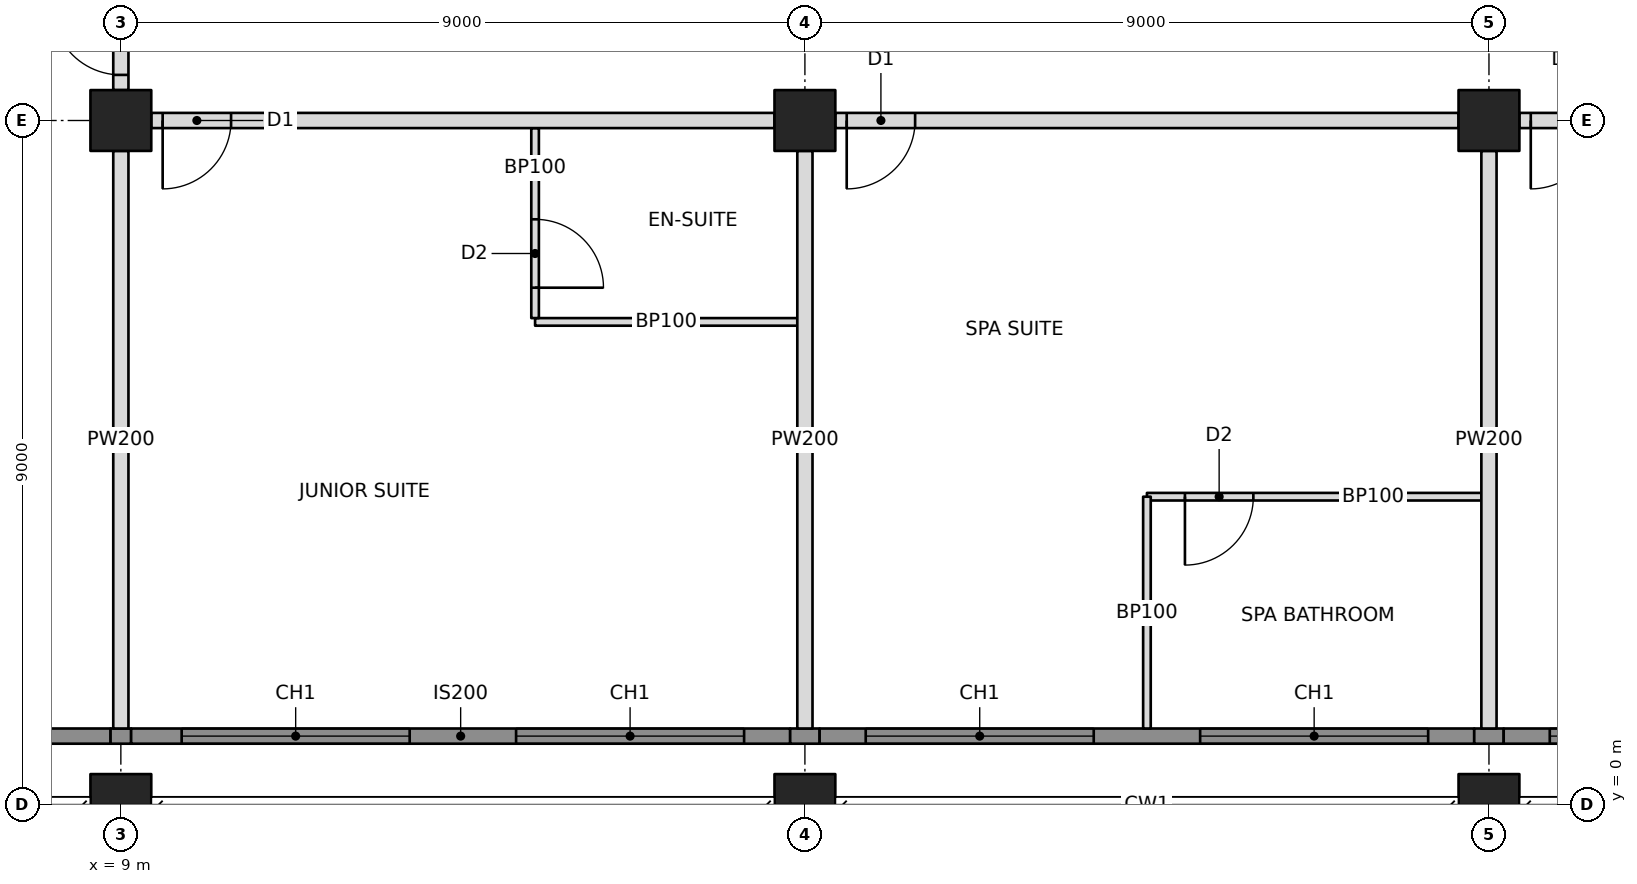
"""IFC4 building model, lengths in metres.
Left out: names, types, materials, properties, quantities, classifications, styles, units other than length and angle.
Written with IfcOpenShell. Run it as: python <this file> out.ifc"""

import sys

from ifc_helpers import new_model, si_unit, direction, frame, frame_2d, origin, origin_2d, place, context, subcontext, project, spatial, rectangle, hollow_rectangle, extrude, element, fill, save


model = new_model("IFC4")
c1 = context("Model", 3, precision=1e-05, world=origin(), true_north=direction((0.0, 1.0)))
c2 = subcontext(c1, "Body", "Model", "MODEL_VIEW")
j1 = project(units=[si_unit("LENGTHUNIT", "METRE"), si_unit("PLANEANGLEUNIT", "RADIAN")], contexts=[c1])
p1 = place(None, origin())
s1 = spatial("IfcSite", under=j1, at=p1, CompositionType="ELEMENT")
p2 = place(p1, origin())
s2 = spatial("IfcBuilding", under=s1, at=p2, CompositionType="ELEMENT")
p3 = place(p2, frame((0.0, 0.0, 180.8)))
s3 = spatial("IfcBuildingStorey", under=s2, at=p3, CompositionType="ELEMENT", Elevation=180.8)
p4 = place(p3, frame((9.0, 0.0, 0.0), z_axis=(0.0, 0.0, 1.0), x_axis=(1.0, 0.0, 0.0)))
e1 = element("IfcColumn", 1, at=p4, inside=s3, PredefinedType="COLUMN", context=c2, shape_type="SweptSolid", body=[
    extrude(hollow_rectangle(XDim=0.8, YDim=0.8, WallThickness=0.07, at=origin_2d()), origin(), (0.0, 0.0, 1.0), 3.4),
])
p5 = place(p3, frame((9.0, 9.0, 0.0), z_axis=(0.0, 0.0, 1.0), x_axis=(1.0, 0.0, 0.0)))
e2 = element("IfcColumn", 2, at=p5, inside=s3, PredefinedType="COLUMN", context=c2, shape_type="SweptSolid", body=[
    extrude(hollow_rectangle(XDim=0.8, YDim=0.8, WallThickness=0.06, at=origin_2d()), origin(), (0.0, 0.0, 1.0), 3.4),
])
p6 = place(p3, frame((18.0, 0.0, 0.0), z_axis=(0.0, 0.0, 1.0), x_axis=(1.0, 0.0, 0.0)))
e3 = element("IfcColumn", 3, at=p6, inside=s3, PredefinedType="COLUMN", context=c2, shape_type="SweptSolid", body=[
    extrude(hollow_rectangle(XDim=0.8, YDim=0.8, WallThickness=0.07, at=origin_2d()), origin(), (0.0, 0.0, 1.0), 3.4),
])
p7 = place(p3, frame((18.0, 9.0, 0.0), z_axis=(0.0, 0.0, 1.0), x_axis=(1.0, 0.0, 0.0)))
e4 = element("IfcColumn", 4, at=p7, inside=s3, PredefinedType="COLUMN", context=c2, shape_type="SweptSolid", body=[
    extrude(hollow_rectangle(XDim=0.8, YDim=0.8, WallThickness=0.06, at=origin_2d()), origin(), (0.0, 0.0, 1.0), 3.4),
])
p8 = place(p3, frame((27.0, 0.0, 0.0), z_axis=(0.0, 0.0, 1.0), x_axis=(1.0, 0.0, 0.0)))
e5 = element("IfcColumn", 5, at=p8, inside=s3, PredefinedType="COLUMN", context=c2, shape_type="SweptSolid", body=[
    extrude(hollow_rectangle(XDim=0.8, YDim=0.8, WallThickness=0.07, at=origin_2d()), origin(), (0.0, 0.0, 1.0), 3.4),
])
p9 = place(p3, frame((27.0, 9.0, 0.0), z_axis=(0.0, 0.0, 1.0), x_axis=(1.0, 0.0, 0.0)))
e6 = element("IfcColumn", 6, at=p9, inside=s3, PredefinedType="COLUMN", context=c2, shape_type="SweptSolid", body=[
    extrude(hollow_rectangle(XDim=0.8, YDim=0.8, WallThickness=0.06, at=origin_2d()), origin(), (0.0, 0.0, 1.0), 3.4),
])
p10 = place(p3, frame((3.0, 0.9, 0.0), z_axis=(0.0, 0.0, 1.0), x_axis=(1.0, 0.0, 0.0)))
e7 = element("IfcWall", 7, at=p10, inside=s3, PredefinedType="SOLIDWALL", context=c2, shape_type="SweptSolid", body=[
    extrude(rectangle(XDim=5.865, YDim=0.2, at=frame_2d((2.932, 0.0))), origin(), (0.0, 0.0, 1.0), 3.2),
])
p11 = place(p10, frame((1.45, 0.0, 0.6)))
e8 = element("IfcOpeningElement", 8, at=p11, cuts=e7, PredefinedType="OPENING", context=c2, shape_type="SweptSolid", body=[
    extrude(rectangle(XDim=3.0, YDim=2.2, at=frame_2d((1.5, 1.1))), frame((0.0, 0.11, 0.0), z_axis=(0.0, -1.0, 0.0), x_axis=(1.0, 0.0, 0.0)), (0.0, 0.0, 1.0), 0.22),
])
p12 = place(p3, frame((9.4, 9.0, 0.0), z_axis=(0.0, 0.0, 1.0), x_axis=(1.0, 0.0, 0.0)))
e9 = element("IfcWall", 9, at=p12, inside=s3, PredefinedType="PARTITIONING", context=c2, shape_type="SweptSolid", body=[
    extrude(rectangle(XDim=8.2, YDim=0.2, at=frame_2d((4.1, 0.0))), origin(), (0.0, 0.0, 1.0), 2.405),
])
p13 = place(p12, frame((0.15, 0.0, 0.0)))
e10 = element("IfcOpeningElement", 10, at=p13, cuts=e9, PredefinedType="OPENING", context=c2, shape_type="SweptSolid", body=[
    extrude(rectangle(XDim=0.9, YDim=2.1, at=frame_2d((0.45, 1.05))), frame((0.0, 0.11, 0.0), z_axis=(0.0, -1.0, 0.0), x_axis=(1.0, 0.0, 0.0)), (0.0, 0.0, 1.0), 0.22),
])
p14 = place(p3, frame((18.4, 9.0, 0.0), z_axis=(0.0, 0.0, 1.0), x_axis=(1.0, 0.0, 0.0)))
e11 = element("IfcWall", 11, at=p14, inside=s3, PredefinedType="PARTITIONING", context=c2, shape_type="SweptSolid", body=[
    extrude(rectangle(XDim=8.2, YDim=0.2, at=frame_2d((4.1, 0.0))), origin(), (0.0, 0.0, 1.0), 2.405),
])
p15 = place(p14, frame((0.15, 0.0, 0.0)))
e12 = element("IfcOpeningElement", 12, at=p15, cuts=e11, PredefinedType="OPENING", context=c2, shape_type="SweptSolid", body=[
    extrude(rectangle(XDim=0.9, YDim=2.1, at=frame_2d((0.45, 1.05))), frame((0.0, 0.11, 0.0), z_axis=(0.0, -1.0, 0.0), x_axis=(1.0, 0.0, 0.0)), (0.0, 0.0, 1.0), 0.22),
])
p16 = place(p3, frame((27.4, 9.0, 0.0), z_axis=(0.0, 0.0, 1.0), x_axis=(1.0, 0.0, 0.0)))
e13 = element("IfcWall", 13, at=p16, inside=s3, PredefinedType="PARTITIONING", context=c2, shape_type="SweptSolid", body=[
    extrude(rectangle(XDim=8.2, YDim=0.2, at=frame_2d((4.1, 0.0))), origin(), (0.0, 0.0, 1.0), 2.405),
])
p17 = place(p16, frame((0.15, 0.0, 0.0)))
e14 = element("IfcOpeningElement", 14, at=p17, cuts=e13, PredefinedType="OPENING", context=c2, shape_type="SweptSolid", body=[
    extrude(rectangle(XDim=0.9, YDim=2.1, at=frame_2d((0.45, 1.05))), frame((0.0, 0.11, 0.0), z_axis=(0.0, -1.0, 0.0), x_axis=(1.0, 0.0, 0.0)), (0.0, 0.0, 1.0), 0.22),
])
p18 = place(p3, frame((9.0, 8.6, 0.0), z_axis=(0.0, 0.0, 1.0), x_axis=(0.0, -1.0, 0.0)))
e15 = element("IfcWall", 15, at=p18, inside=s3, PredefinedType="PARTITIONING", context=c2, shape_type="SweptSolid", body=[
    extrude(rectangle(XDim=7.6, YDim=0.2, at=frame_2d((3.8, 0.0))), origin(), (0.0, 0.0, 1.0), 2.438),
])
for number, where, z_axis, x_axis in (
    (16, (18.0, 8.6, 0.0), (0.0, 0.0, 1.0), (0.0, -1.0, 0.0)),
    (17, (27.0, 8.6, 0.0), (0.0, 0.0, 1.0), (0.0, -1.0, 0.0)),
):
    element("IfcWall", number, at=place(p3, frame(where, z_axis=z_axis, x_axis=x_axis)), inside=s3, PredefinedType="PARTITIONING", context=c2, shape_type="SweptSolid", body=[
        extrude(rectangle(XDim=7.6, YDim=0.2, at=frame_2d((3.8, 0.0))), origin(), (0.0, 0.0, 1.0), 2.405),
    ])
p19 = place(p3, frame((14.45, 6.35, 0.0), z_axis=(0.0, 0.0, 1.0), x_axis=(1.0, 0.0, 0.0)))
e18 = element("IfcWall", 18, at=p19, inside=s3, PredefinedType="PARTITIONING", context=c2, shape_type="SweptSolid", body=[
    extrude(rectangle(XDim=3.45, YDim=0.1, at=frame_2d((1.725, 0.0))), origin(), (0.0, 0.0, 1.0), 2.404),
])
p20 = place(p3, frame((14.45, 8.9, 0.0), z_axis=(0.0, 0.0, 1.0), x_axis=(0.0, -1.0, 0.0)))
e19 = element("IfcWall", 19, at=p20, inside=s3, PredefinedType="PARTITIONING", context=c2, shape_type="SweptSolid", body=[
    extrude(rectangle(XDim=2.5, YDim=0.1, at=frame_2d((1.25, 0.0))), origin(), (0.0, 0.0, 1.0), 2.404),
])
p21 = place(p20, frame((1.2, 0.0, 0.0)))
e20 = element("IfcOpeningElement", 20, at=p21, cuts=e19, PredefinedType="OPENING", context=c2, shape_type="SweptSolid", body=[
    extrude(rectangle(XDim=0.9, YDim=2.1, at=frame_2d((0.45, 1.05))), frame((0.0, 0.06, 0.0), z_axis=(0.0, -1.0, 0.0), x_axis=(1.0, 0.0, 0.0)), (0.0, 0.0, 1.0), 0.12),
])
p22 = place(p3, frame((22.5, 4.05, 0.0), z_axis=(0.0, 0.0, 1.0), x_axis=(1.0, 0.0, 0.0)))
e21 = element("IfcWall", 21, at=p22, inside=s3, PredefinedType="PARTITIONING", context=c2, shape_type="SweptSolid", body=[
    extrude(rectangle(XDim=4.4, YDim=0.1, at=frame_2d((2.2, 0.0))), origin(), (0.0, 0.0, 1.0), 2.404),
])
p23 = place(p22, frame((0.5, 0.0, 0.0)))
e22 = element("IfcOpeningElement", 22, at=p23, cuts=e21, PredefinedType="OPENING", context=c2, shape_type="SweptSolid", body=[
    extrude(rectangle(XDim=0.9, YDim=2.1, at=frame_2d((0.45, 1.05))), frame((0.0, 0.06, 0.0), z_axis=(0.0, -1.0, 0.0), x_axis=(1.0, 0.0, 0.0)), (0.0, 0.0, 1.0), 0.12),
])
p24 = place(p3, frame((22.5, 4.05, 0.0), z_axis=(0.0, 0.0, 1.0), x_axis=(0.0, -1.0, 0.0)))
e23 = element("IfcWall", 23, at=p24, inside=s3, PredefinedType="PARTITIONING", context=c2, shape_type="SweptSolid", body=[
    extrude(rectangle(XDim=3.05, YDim=0.1, at=frame_2d((1.525, 0.0))), origin(), (0.0, 0.0, 1.0), 3.2),
])
p25 = place(p3, frame((9.0, 9.4, 0.0), z_axis=(0.0, 0.0, 1.0), x_axis=(0.0, 1.0, 0.0)))
e24 = element("IfcWall", 24, at=p25, inside=s3, PredefinedType="PARTITIONING", context=c2, shape_type="SweptSolid", body=[
    extrude(rectangle(XDim=1.3, YDim=0.2, at=frame_2d((0.65, 0.0))), origin(), (0.0, 0.0, 1.0), 2.405),
])
p26 = place(p25, frame((0.2, 0.0, 0.0)))
e25 = element("IfcOpeningElement", 25, at=p26, cuts=e24, PredefinedType="OPENING", context=c2, shape_type="SweptSolid", body=[
    extrude(rectangle(XDim=0.9, YDim=2.1, at=frame_2d((0.45, 1.05))), frame((0.0, 0.11, 0.0), z_axis=(0.0, -1.0, 0.0), x_axis=(1.0, 0.0, 0.0)), (0.0, 0.0, 1.0), 0.22),
])
p27 = place(p3, frame((8.865, 0.9, 0.0), z_axis=(0.0, 0.0, 1.0), x_axis=(1.0, 0.0, 0.0)))
e26 = element("IfcWall", 26, at=p27, inside=s3, PredefinedType="SOLIDWALL", context=c2, shape_type="SweptSolid", body=[
    extrude(rectangle(XDim=0.271, YDim=0.2, at=frame_2d((0.135, 0.0))), origin(), (0.0, 0.0, 1.0), 2.438),
])
p28 = place(p3, frame((9.135, 0.9, 0.0), z_axis=(0.0, 0.0, 1.0), x_axis=(1.0, 0.0, 0.0)))
e27 = element("IfcWall", 27, at=p28, inside=s3, PredefinedType="SOLIDWALL", context=c2, shape_type="SweptSolid", body=[
    extrude(rectangle(XDim=8.671, YDim=0.2, at=frame_2d((4.335, 0.0))), origin(), (0.0, 0.0, 1.0), 3.2),
])
p29 = place(p28, frame((0.665, 0.0, 0.6)))
e28 = element("IfcOpeningElement", 28, at=p29, cuts=e27, PredefinedType="OPENING", context=c2, shape_type="SweptSolid", body=[
    extrude(rectangle(XDim=3.0, YDim=2.2, at=frame_2d((1.5, 1.1))), frame((0.0, 0.11, 0.0), z_axis=(0.0, -1.0, 0.0), x_axis=(1.0, 0.0, 0.0)), (0.0, 0.0, 1.0), 0.22),
])
p30 = place(p28, frame((5.065, 0.0, 0.6)))
e29 = element("IfcOpeningElement", 29, at=p30, cuts=e27, PredefinedType="OPENING", context=c2, shape_type="SweptSolid", body=[
    extrude(rectangle(XDim=3.0, YDim=2.2, at=frame_2d((1.5, 1.1))), frame((0.0, 0.11, 0.0), z_axis=(0.0, -1.0, 0.0), x_axis=(1.0, 0.0, 0.0)), (0.0, 0.0, 1.0), 0.22),
])
p31 = place(p3, frame((17.806, 0.9, 0.0), z_axis=(0.0, 0.0, 1.0), x_axis=(1.0, 0.0, 0.0)))
e30 = element("IfcWall", 30, at=p31, inside=s3, PredefinedType="SOLIDWALL", context=c2, shape_type="SweptSolid", body=[
    extrude(rectangle(XDim=0.388, YDim=0.2, at=frame_2d((0.194, 0.0))), origin(), (0.0, 0.0, 1.0), 2.404),
])
p32 = place(p3, frame((18.194, 0.9, 0.0), z_axis=(0.0, 0.0, 1.0), x_axis=(1.0, 0.0, 0.0)))
e31 = element("IfcWall", 31, at=p32, inside=s3, PredefinedType="SOLIDWALL", context=c2, shape_type="SweptSolid", body=[
    extrude(rectangle(XDim=8.612, YDim=0.2, at=frame_2d((4.306, 0.0))), origin(), (0.0, 0.0, 1.0), 3.2),
])
p33 = place(p32, frame((0.606, 0.0, 0.6)))
e32 = element("IfcOpeningElement", 32, at=p33, cuts=e31, PredefinedType="OPENING", context=c2, shape_type="SweptSolid", body=[
    extrude(rectangle(XDim=3.0, YDim=2.2, at=frame_2d((1.5, 1.1))), frame((0.0, 0.11, 0.0), z_axis=(0.0, -1.0, 0.0), x_axis=(1.0, 0.0, 0.0)), (0.0, 0.0, 1.0), 0.22),
])
p34 = place(p32, frame((5.006, 0.0, 0.6)))
e33 = element("IfcOpeningElement", 33, at=p34, cuts=e31, PredefinedType="OPENING", context=c2, shape_type="SweptSolid", body=[
    extrude(rectangle(XDim=3.0, YDim=2.2, at=frame_2d((1.5, 1.1))), frame((0.0, 0.11, 0.0), z_axis=(0.0, -1.0, 0.0), x_axis=(1.0, 0.0, 0.0)), (0.0, 0.0, 1.0), 0.22),
])
p35 = place(p3, frame((26.806, 0.9, 0.0), z_axis=(0.0, 0.0, 1.0), x_axis=(1.0, 0.0, 0.0)))
e34 = element("IfcWall", 34, at=p35, inside=s3, PredefinedType="SOLIDWALL", context=c2, shape_type="SweptSolid", body=[
    extrude(rectangle(XDim=0.388, YDim=0.2, at=frame_2d((0.194, 0.0))), origin(), (0.0, 0.0, 1.0), 2.404),
])
p36 = place(p3, frame((27.194, 0.9, 0.0), z_axis=(0.0, 0.0, 1.0), x_axis=(1.0, 0.0, 0.0)))
e35 = element("IfcWall", 35, at=p36, inside=s3, PredefinedType="SOLIDWALL", context=c2, shape_type="SweptSolid", body=[
    extrude(rectangle(XDim=8.671, YDim=0.2, at=frame_2d((4.335, 0.0))), origin(), (0.0, 0.0, 1.0), 3.2),
])
p37 = place(p36, frame((0.606, 0.0, 0.6)))
e36 = element("IfcOpeningElement", 36, at=p37, cuts=e35, PredefinedType="OPENING", context=c2, shape_type="SweptSolid", body=[
    extrude(rectangle(XDim=3.0, YDim=2.2, at=frame_2d((1.5, 1.1))), frame((0.0, 0.11, 0.0), z_axis=(0.0, -1.0, 0.0), x_axis=(1.0, 0.0, 0.0)), (0.0, 0.0, 1.0), 0.22),
])
p38 = place(p36, frame((5.006, 0.0, 0.6)))
e37 = element("IfcOpeningElement", 37, at=p38, cuts=e35, PredefinedType="OPENING", context=c2, shape_type="SweptSolid", body=[
    extrude(rectangle(XDim=3.0, YDim=2.2, at=frame_2d((1.5, 1.1))), frame((0.0, 0.11, 0.0), z_axis=(0.0, -1.0, 0.0), x_axis=(1.0, 0.0, 0.0)), (0.0, 0.0, 1.0), 0.22),
])
p39 = place(p29, origin())
e38 = element("IfcWindow", 38, at=p39, inside=s3, PartitioningType="TRIPLE_PANEL_VERTICAL", PredefinedType="WINDOW", context=c2, shape_type="SweptSolid", body=[
    extrude(rectangle(XDim=3.0, YDim=2.2, at=frame_2d((1.5, 1.1))), frame((0.0, 0.03, 0.0), z_axis=(0.0, -1.0, 0.0), x_axis=(1.0, 0.0, 0.0)), (0.0, 0.0, 1.0), 0.06),
])
fill(e28, e38)
p40 = place(p30, origin())
e39 = element("IfcWindow", 39, at=p40, inside=s3, PartitioningType="TRIPLE_PANEL_VERTICAL", PredefinedType="WINDOW", context=c2, shape_type="SweptSolid", body=[
    extrude(rectangle(XDim=3.0, YDim=2.2, at=frame_2d((1.5, 1.1))), frame((0.0, 0.03, 0.0), z_axis=(0.0, -1.0, 0.0), x_axis=(1.0, 0.0, 0.0)), (0.0, 0.0, 1.0), 0.06),
])
fill(e29, e39)
p41 = place(p33, origin())
e40 = element("IfcWindow", 40, at=p41, inside=s3, PartitioningType="TRIPLE_PANEL_VERTICAL", PredefinedType="WINDOW", context=c2, shape_type="SweptSolid", body=[
    extrude(rectangle(XDim=3.0, YDim=2.2, at=frame_2d((1.5, 1.1))), frame((0.0, 0.03, 0.0), z_axis=(0.0, -1.0, 0.0), x_axis=(1.0, 0.0, 0.0)), (0.0, 0.0, 1.0), 0.06),
])
fill(e32, e40)
p42 = place(p34, origin())
e41 = element("IfcWindow", 41, at=p42, inside=s3, PartitioningType="TRIPLE_PANEL_VERTICAL", PredefinedType="WINDOW", context=c2, shape_type="SweptSolid", body=[
    extrude(rectangle(XDim=3.0, YDim=2.2, at=frame_2d((1.5, 1.1))), frame((0.0, 0.03, 0.0), z_axis=(0.0, -1.0, 0.0), x_axis=(1.0, 0.0, 0.0)), (0.0, 0.0, 1.0), 0.06),
])
fill(e33, e41)
p43 = place(p37, origin())
e42 = element("IfcWindow", 42, at=p43, inside=s3, PartitioningType="TRIPLE_PANEL_VERTICAL", PredefinedType="WINDOW", context=c2, shape_type="SweptSolid", body=[
    extrude(rectangle(XDim=3.0, YDim=2.2, at=frame_2d((1.5, 1.1))), frame((0.0, 0.03, 0.0), z_axis=(0.0, -1.0, 0.0), x_axis=(1.0, 0.0, 0.0)), (0.0, 0.0, 1.0), 0.06),
])
fill(e36, e42)
p44 = place(p21, origin())
e43 = element("IfcDoor", 43, at=p44, inside=s3, OperationType="SINGLE_SWING_RIGHT", PredefinedType="DOOR", context=c2, shape_type="SweptSolid", body=[
    extrude(rectangle(XDim=0.9, YDim=2.1, at=frame_2d((0.45, 1.05))), frame((0.0, 0.025, 0.0), z_axis=(0.0, -1.0, 0.0), x_axis=(1.0, 0.0, 0.0)), (0.0, 0.0, 1.0), 0.05),
])
fill(e20, e43)
p45 = place(p13, frame((0.9, 0.0, 0.0), z_axis=(0.0, 0.0, 1.0), x_axis=(-1.0, 0.0, 0.0)))
e44 = element("IfcDoor", 44, at=p45, inside=s3, OperationType="SINGLE_SWING_RIGHT", PredefinedType="DOOR", context=c2, shape_type="SweptSolid", body=[
    extrude(rectangle(XDim=0.9, YDim=2.1, at=frame_2d((0.45, 1.05))), frame((0.0, 0.025, 0.0), z_axis=(0.0, -1.0, 0.0), x_axis=(1.0, 0.0, 0.0)), (0.0, 0.0, 1.0), 0.05),
])
fill(e10, e44)
p46 = place(p23, frame((0.9, 0.0, 0.0), z_axis=(0.0, 0.0, 1.0), x_axis=(-1.0, 0.0, 0.0)))
e45 = element("IfcDoor", 45, at=p46, inside=s3, OperationType="SINGLE_SWING_RIGHT", PredefinedType="DOOR", context=c2, shape_type="SweptSolid", body=[
    extrude(rectangle(XDim=0.9, YDim=2.1, at=frame_2d((0.45, 1.05))), frame((0.0, 0.025, 0.0), z_axis=(0.0, -1.0, 0.0), x_axis=(1.0, 0.0, 0.0)), (0.0, 0.0, 1.0), 0.05),
])
fill(e22, e45)
p47 = place(p15, frame((0.9, 0.0, 0.0), z_axis=(0.0, 0.0, 1.0), x_axis=(-1.0, 0.0, 0.0)))
e46 = element("IfcDoor", 46, at=p47, inside=s3, OperationType="SINGLE_SWING_RIGHT", PredefinedType="DOOR", context=c2, shape_type="SweptSolid", body=[
    extrude(rectangle(XDim=0.9, YDim=2.1, at=frame_2d((0.45, 1.05))), frame((0.0, 0.025, 0.0), z_axis=(0.0, -1.0, 0.0), x_axis=(1.0, 0.0, 0.0)), (0.0, 0.0, 1.0), 0.05),
])
fill(e12, e46)
p48 = place(p17, frame((0.9, 0.0, 0.0), z_axis=(0.0, 0.0, 1.0), x_axis=(-1.0, 0.0, 0.0)))
e47 = element("IfcDoor", 47, at=p48, inside=s3, OperationType="SINGLE_SWING_RIGHT", PredefinedType="DOOR", context=c2, shape_type="SweptSolid", body=[
    extrude(rectangle(XDim=0.9, YDim=2.1, at=frame_2d((0.45, 1.05))), frame((0.0, 0.025, 0.0), z_axis=(0.0, -1.0, 0.0), x_axis=(1.0, 0.0, 0.0)), (0.0, 0.0, 1.0), 0.05),
])
fill(e14, e47)
p49 = place(p26, origin())
e48 = element("IfcDoor", 48, at=p49, inside=s3, OperationType="SINGLE_SWING_RIGHT", PredefinedType="DOOR", context=c2, shape_type="SweptSolid", body=[
    extrude(rectangle(XDim=0.9, YDim=2.1, at=frame_2d((0.45, 1.05))), frame((0.0, 0.025, 0.0), z_axis=(0.0, -1.0, 0.0), x_axis=(1.0, 0.0, 0.0)), (0.0, 0.0, 1.0), 0.05),
])
fill(e25, e48)
save(model, sys.argv[1])
